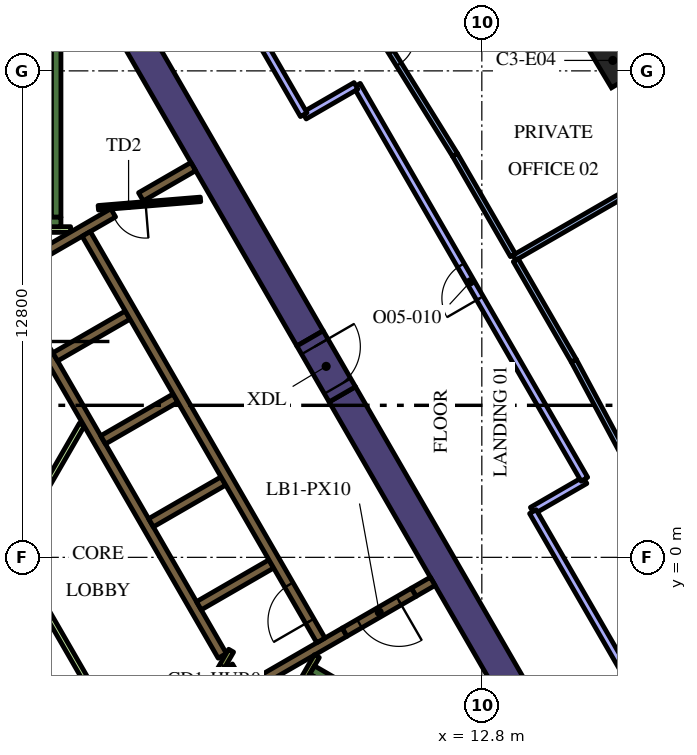
"""IFC4 building model, lengths in metres.
Left out: names, types, materials, properties, quantities, classifications, styles, units other than length and angle.
Written with IfcOpenShell. Run it as: python <this file> out.ifc"""

import sys

from ifc_helpers import new_model, si_unit, direction, frame, frame_2d, origin, origin_2d, place, context, subcontext, project, spatial, rectangle, extrude, element, fill, save


model = new_model("IFC4")
c1 = context("Model", 3, precision=1e-05, world=origin(), true_north=direction((0.0, 1.0)))
c2 = subcontext(c1, "Body", "Model", "MODEL_VIEW")
j1 = project(units=[si_unit("LENGTHUNIT", "METRE"), si_unit("PLANEANGLEUNIT", "RADIAN")], contexts=[c1])
p1 = place(None, origin())
s1 = spatial("IfcSite", under=j1, at=p1, CompositionType="ELEMENT")
p2 = place(p1, origin())
s2 = spatial("IfcBuilding", under=s1, at=p2, CompositionType="ELEMENT")
p3 = place(p2, frame((0.0, 0.0, 192.0)))
s3 = spatial("IfcBuildingStorey", under=s2, at=p3, CompositionType="ELEMENT", Elevation=192.0)
p4 = place(p3, frame((16.247, 13.075, 0.0), z_axis=(0.0, 0.0, 1.0), x_axis=(-0.513159311736, 0.85829337687, 0.0)))
e1 = element("IfcColumn", 1, at=p4, inside=s3, PredefinedType="COLUMN", context=c2, shape_type="SweptSolid", body=[
    extrude(rectangle(XDim=1.2, YDim=0.8, at=origin_2d()), origin(), (0.0, 0.0, 1.0), 4.2),
])
p5 = place(p3, frame((9.129, 4.289, 0.0), z_axis=(0.0, 0.0, 1.0), x_axis=(0.499995742806, -0.866027861663, 0.0)))
e2 = element("IfcWall", 2, at=p5, inside=s3, PredefinedType="SOLIDWALL", context=c2, shape_type="SweptSolid", body=[
    extrude(rectangle(XDim=12.527, YDim=0.8, at=frame_2d((6.264, 0.0))), origin(), (0.0, 0.0, 1.0), 4.2),
])
p6 = place(p3, frame((8.279, 5.761, 0.0), z_axis=(0.0, 0.0, 1.0), x_axis=(-0.500010359015, 0.866019422922, 0.0)))
e3 = element("IfcWall", 3, at=p6, inside=s3, PredefinedType="SOLIDWALL", context=c2, shape_type="SweptSolid", body=[
    extrude(rectangle(XDim=12.528, YDim=0.8, at=frame_2d((6.264, 0.0))), origin(), (0.0, 0.0, 1.0), 4.2),
])
p7 = place(p3, frame((8.334, -2.964, 0.0), z_axis=(0.0, 0.0, 1.0), x_axis=(0.866016039709, -0.500016218704, 0.0)))
e4 = element("IfcWall", 4, at=p7, inside=s3, PredefinedType="SOLIDWALL", context=c2, shape_type="SweptSolid", body=[
    extrude(rectangle(XDim=7.05, YDim=0.25, at=frame_2d((3.525, 0.0))), origin(), (0.0, 0.0, 1.0), 4.2),
])
p8 = place(p3, frame((8.168, -3.503, 0.0), z_axis=(0.0, 0.0, 1.0), x_axis=(0.49972245349, 0.866185586049, 0.0)))
e5 = element("IfcWall", 5, at=p8, inside=s3, PredefinedType="SOLIDWALL", context=c2, shape_type="SweptSolid", body=[
    extrude(rectangle(XDim=0.425, YDim=0.25, at=frame_2d((0.212, 0.0))), origin(), (0.0, 0.0, 1.0), 4.2),
])
p9 = place(p3, frame((1.6, 8.95, 0.0), z_axis=(0.0, 0.0, 1.0), x_axis=(0.0, 1.0, 0.0)))
e6 = element("IfcWall", 6, at=p9, inside=s3, PredefinedType="SOLIDWALL", context=c2, shape_type="SweptSolid", body=[
    extrude(rectangle(XDim=6.8, YDim=0.25, at=frame_2d((3.4, 0.0))), origin(), (0.0, 0.0, 1.0), 4.2),
])
p10 = place(p3, frame((1.05, 8.825, 0.0), z_axis=(0.0, 0.0, 1.0), x_axis=(1.0, 0.0, 0.0)))
e7 = element("IfcWall", 7, at=p10, inside=s3, PredefinedType="SOLIDWALL", context=c2, shape_type="SweptSolid", body=[
    extrude(rectangle(XDim=0.675, YDim=0.25, at=frame_2d((0.337, 0.0))), origin(), (0.0, 0.0, 1.0), 4.2),
])
p11 = place(p3, frame((9.19, -1.969, 0.0), z_axis=(0.0, 0.0, 1.0), x_axis=(-0.866057109641, -0.499945079824, 0.0)))
e8 = element("IfcWall", 8, at=p11, inside=s3, PredefinedType="SOLIDWALL", context=c2, shape_type="SweptSolid", body=[
    extrude(rectangle(XDim=3.291, YDim=0.25, at=frame_2d((1.646, 0.0))), origin(), (0.0, 0.0, 1.0), 4.2),
])
p12 = place(p3, frame((6.13, -2.867, 0.0), z_axis=(0.0, 0.0, 1.0), x_axis=(0.500160776593, -0.865932559475, 0.0)))
e9 = element("IfcWall", 9, at=p12, inside=s3, PredefinedType="SOLIDWALL", context=c2, shape_type="SweptSolid", body=[
    extrude(rectangle(XDim=0.627, YDim=0.25, at=frame_2d((0.313, 0.0))), origin(), (0.0, 0.0, 1.0), 4.2),
])
p13 = place(p3, frame((11.507, -0.631, 0.0), z_axis=(0.0, 0.0, 1.0), x_axis=(-0.866093731455, -0.499881634324, 0.0)))
e10 = element("IfcWall", 10, at=p13, inside=s3, PredefinedType="SOLIDWALL", context=c2, shape_type="SweptSolid", body=[
    extrude(rectangle(XDim=0.575, YDim=0.25, at=frame_2d((0.288, 0.0))), origin(), (0.0, 0.0, 1.0), 4.2),
])
p14 = place(p3, frame((3.1, 9.064, 0.0), z_axis=(0.0, 0.0, 1.0), x_axis=(-0.866033137035, -0.499986605379, 0.0)))
e11 = element("IfcWall", 11, at=p14, inside=s3, PredefinedType="SOLIDWALL", context=c2, shape_type="SweptSolid", body=[
    extrude(rectangle(XDim=3.467, YDim=0.25, at=frame_2d((1.733, 0.0))), origin(), (0.0, 0.0, 1.0), 4.2),
])
p15 = place(p3, frame((5.97, -2.591, 0.0), z_axis=(0.0, 0.0, 1.0), x_axis=(-0.499994469932, 0.866028596547, 0.0)))
e12 = element("IfcWall", 12, at=p15, inside=s3, PredefinedType="SOLIDWALL", context=c2, shape_type="SweptSolid", body=[
    extrude(rectangle(XDim=10.488, YDim=0.25, at=frame_2d((5.244, 0.0))), origin(), (0.0, 0.0, 1.0), 4.2),
])
p16 = place(p3, frame((1.574, 5.274, 0.0), z_axis=(0.0, 0.0, 1.0), x_axis=(0.866028486751, 0.499994660107, 0.0)))
e13 = element("IfcWall", 13, at=p16, inside=s3, PredefinedType="SOLIDWALL", context=c2, shape_type="SweptSolid", body=[
    extrude(rectangle(XDim=2.2, YDim=0.25, at=frame_2d((1.1, 0.0))), origin(), (0.0, 0.0, 1.0), 4.2),
])
for number, where, z_axis, x_axis in (
    (14, (2.834, 3.091, 0.0), (0.0, 0.0, 1.0), (0.866, 0.5, 0.0)),
    (15, (4.094, 0.909, 0.0), (0.0, 0.0, 1.0), (0.866, 0.5, 0.0)),
    (16, (5.354, -1.274, 0.0), (0.0, 0.0, 1.0), (0.866, 0.5, 0.0)),
):
    element("IfcWall", number, at=place(p3, frame(where, z_axis=z_axis, x_axis=x_axis)), inside=s3, PredefinedType="SOLIDWALL", context=c2, shape_type="SweptSolid", body=[
        extrude(rectangle(XDim=2.2, YDim=0.25, at=frame_2d((1.1, 0.0))), origin(), (0.0, 0.0, 1.0), 4.2),
    ])
p17 = place(p3, frame((3.83, 9.486, 0.0), z_axis=(0.0, 0.0, 1.0), x_axis=(0.865986202621, 0.500067892261, 0.0)))
e17 = element("IfcWall", 17, at=p17, inside=s3, PredefinedType="SOLIDWALL", context=c2, shape_type="SweptSolid", body=[
    extrude(rectangle(XDim=1.591, YDim=0.25, at=frame_2d((0.795, 0.0))), origin(), (0.0, 0.0, 1.0), 4.2),
])
p18 = place(p3, frame((1.05, 8.625, 0.0), z_axis=(0.0, 0.0, 1.0), x_axis=(1.0, 0.0, 0.0)))
e18 = element("IfcWall", 18, at=p18, inside=s3, PredefinedType="PARTITIONING", context=c2, shape_type="SweptSolid", body=[
    extrude(rectangle(XDim=0.929, YDim=0.15, at=frame_2d((0.464, 0.0))), origin(), (0.0, 0.0, 1.0), 3.1),
])
p19 = place(p3, frame((8.459, -2.599, 0.0), z_axis=(0.0, 0.0, 1.0), x_axis=(-0.500041054325, -0.866001699761, 0.0)))
e19 = element("IfcWall", 19, at=p19, inside=s3, PredefinedType="PARTITIONING", context=c2, shape_type="SweptSolid", body=[
    extrude(rectangle(XDim=0.929, YDim=0.15, at=frame_2d((0.464, 0.0))), origin(), (0.0, 0.0, 1.0), 4.2),
])
p20 = place(p3, frame((-1.887, 4.168, 0.0), z_axis=(0.0, 0.0, 1.0), x_axis=(0.499997069472, -0.866027095719, 0.0)))
e20 = element("IfcWall", 20, at=p20, inside=s3, PredefinedType="PARTITIONING", context=c2, shape_type="SweptSolid", body=[
    extrude(rectangle(XDim=9.106, YDim=0.15, at=frame_2d((4.553, 0.0))), origin(), (0.0, 0.0, 1.0), 3.1),
])
p21 = place(p3, frame((2.277, 3.493, 0.0), z_axis=(0.0, 0.0, 1.0), x_axis=(-0.499994550825, -0.866028549844, 0.0)))
e21 = element("IfcWall", 21, at=p21, inside=s3, PredefinedType="PARTITIONING", context=c2, shape_type="SweptSolid", body=[
    extrude(rectangle(XDim=3.65, YDim=0.15, at=frame_2d((1.825, 0.0))), origin(), (0.0, 0.0, 1.0), 3.1),
])
p22 = place(p3, frame((8.565, -2.185, 0.0), z_axis=(0.0, 0.0, 1.0), x_axis=(-0.499997954832, 0.866026584559, 0.0)))
e22 = element("IfcWall", 22, at=p22, inside=s3, PredefinedType="SOLIDWALL", context=c2, shape_type="SweptSolid", body=[
    extrude(rectangle(XDim=12.35, YDim=0.25, at=frame_2d((6.175, 0.0))), origin(), (0.0, 0.0, 1.0), 4.2),
])
p23 = place(p22, frame((0.585, 0.0, 0.0)))
e23 = element("IfcOpeningElement", 23, at=p23, cuts=e22, PredefinedType="OPENING", context=c2, shape_type="SweptSolid", body=[
    extrude(rectangle(XDim=1.1, YDim=2.1, at=frame_2d((0.55, 1.05))), frame((0.0, 0.135, 0.0), z_axis=(0.0, -1.0, 0.0), x_axis=(1.0, 0.0, 0.0)), (0.0, 0.0, 1.0), 0.27),
])
p24 = place(p3, frame((5.398, 9.419, 0.0), z_axis=(0.0, 0.0, 1.0), x_axis=(-0.996653416376, -0.081743303248, 0.0)))
e24 = element("IfcWall", 24, at=p24, inside=s3, PredefinedType="PARTITIONING", context=c2, shape_type="SweptSolid", body=[
    extrude(rectangle(XDim=2.7, YDim=0.12, at=frame_2d((1.35, 0.0))), origin(), (0.0, 0.0, 1.0), 3.1),
])
p25 = place(p24, frame((1.45, 0.0, 0.0)))
e25 = element("IfcOpeningElement", 25, at=p25, cuts=e24, PredefinedType="OPENING", context=c2, shape_type="SweptSolid", body=[
    extrude(rectangle(XDim=0.9, YDim=2.1, at=frame_2d((0.45, 1.05))), frame((0.0, 0.07, 0.0), z_axis=(0.0, -1.0, 0.0), x_axis=(1.0, 0.0, 0.0)), (0.0, 0.0, 1.0), 0.14),
])
p26 = place(p3, frame((6.203, -2.456, 0.0), z_axis=(0.0, 0.0, 1.0), x_axis=(-0.500043961785, -0.866000020948, 0.0)))
e26 = element("IfcWall", 26, at=p26, inside=s3, PredefinedType="PARTITIONING", context=c2, shape_type="SweptSolid", body=[
    extrude(rectangle(XDim=1.95, YDim=0.15, at=frame_2d((0.975, 0.0))), origin(), (0.0, 0.0, 1.0), 4.2),
])
p27 = place(p26, frame((0.45, 0.0, 0.0)))
e27 = element("IfcOpeningElement", 27, at=p27, cuts=e26, PredefinedType="OPENING", context=c2, shape_type="SweptSolid", body=[
    extrude(rectangle(XDim=0.9, YDim=2.1, at=frame_2d((0.45, 1.05))), frame((0.0, 0.085, 0.0), z_axis=(0.0, -1.0, 0.0), x_axis=(1.0, 0.0, 0.0)), (0.0, 0.0, 1.0), 0.17),
])
p28 = place(p3, frame((11.009, -0.919, 0.0), z_axis=(0.0, 0.0, 1.0), x_axis=(-0.866059744384, -0.49994051562, 0.0)))
e28 = element("IfcWall", 28, at=p28, inside=s3, PredefinedType="SOLIDWALL", context=c2, shape_type="SweptSolid", body=[
    extrude(rectangle(XDim=2.1, YDim=0.25, at=frame_2d((1.05, 0.0))), origin(), (0.0, 0.0, 1.0), 4.2),
])
p29 = place(p28, frame((0.45, 0.0, 0.0)))
e29 = element("IfcOpeningElement", 29, at=p29, cuts=e28, PredefinedType="OPENING", context=c2, shape_type="SweptSolid", body=[
    extrude(rectangle(XDim=1.2, YDim=2.1, at=frame_2d((0.6, 1.05))), frame((0.0, 0.135, 0.0), z_axis=(0.0, -1.0, 0.0), x_axis=(1.0, 0.0, 0.0)), (0.0, 0.0, 1.0), 0.27),
])
p30 = place(p3, frame((8.279, 5.761, 0.0), z_axis=(0.0, 0.0, 1.0), x_axis=(0.500062241894, -0.865989465428, 0.0)))
e30 = element("IfcWall", 30, at=p30, inside=s3, PredefinedType="SOLIDWALL", context=c2, shape_type="SweptSolid", body=[
    extrude(rectangle(XDim=1.7, YDim=0.8, at=frame_2d((0.85, 0.0))), origin(), (0.0, 0.0, 1.0), 4.2),
])
p31 = place(p30, frame((0.25, 0.0, 0.0)))
e31 = element("IfcOpeningElement", 31, at=p31, cuts=e30, PredefinedType="OPENING", context=c2, shape_type="SweptSolid", body=[
    extrude(rectangle(XDim=1.2, YDim=2.1, at=frame_2d((0.6, 1.05))), frame((0.0, 0.41, 0.0), z_axis=(0.0, -1.0, 0.0), x_axis=(1.0, 0.0, 0.0)), (0.0, 0.0, 1.0), 0.82),
])
p32 = place(p3, frame((13.656, 7.884, 0.0), z_axis=(0.0, 0.0, 1.0), x_axis=(0.866022959057, 0.500004234368, 0.0)))
e32 = element("IfcWall", 32, at=p32, inside=s3, PredefinedType="PARTITIONING", context=c2, shape_type="SweptSolid", body=[
    extrude(rectangle(XDim=5.0, YDim=0.15, at=frame_2d((2.5, 0.0))), origin(), (0.0, 0.0, 1.0), 3.1),
])
p33 = place(p3, frame((15.219, 5.177, 0.0), z_axis=(0.0, 0.0, 1.0), x_axis=(0.472318506028, -0.881427948765, 0.0)))
e33 = element("IfcWall", 33, at=p33, inside=s3, PredefinedType="PARTITIONING", context=c2, shape_type="SweptSolid", body=[
    extrude(rectangle(XDim=6.419, YDim=0.15, at=frame_2d((3.21, 0.0))), origin(), (0.0, 0.0, 1.0), 3.1),
])
p34 = place(p33, frame((2.719, 0.0, 0.0)))
e34 = element("IfcOpeningElement", 34, at=p34, cuts=e33, PredefinedType="OPENING", context=c2, shape_type="SweptSolid", body=[
    extrude(rectangle(XDim=0.9, YDim=2.1, at=frame_2d((0.45, 1.05))), frame((0.0, 0.085, 0.0), z_axis=(0.0, -1.0, 0.0), x_axis=(1.0, 0.0, 0.0)), (0.0, 0.0, 1.0), 0.17),
])
p35 = place(p3, frame((15.219, 5.177, 0.0), z_axis=(0.0, 0.0, 1.0), x_axis=(-0.500054937028, 0.865993683553, 0.0)))
e35 = element("IfcWall", 35, at=p35, inside=s3, PredefinedType="PARTITIONING", context=c2, shape_type="SweptSolid", body=[
    extrude(rectangle(XDim=3.051, YDim=0.15, at=frame_2d((1.525, 0.0))), origin(), (0.0, 0.0, 1.0), 3.1),
])
p36 = place(p3, frame((13.618, 7.949, 0.0), z_axis=(0.0, 0.0, 1.0), x_axis=(-0.499994921628, 0.866028335764, 0.0)))
e36 = element("IfcWall", 36, at=p36, inside=s3, PredefinedType="PARTITIONING", context=c2, shape_type="SweptSolid", body=[
    extrude(rectangle(XDim=3.051, YDim=0.15, at=frame_2d((1.525, 0.0))), origin(), (0.0, 0.0, 1.0), 3.1),
])
p37 = place(p3, frame((8.708, 16.046, 0.0), z_axis=(0.0, 0.0, 1.0), x_axis=(0.527179193015, -0.849754140003, 0.0)))
e37 = element("IfcWall", 37, at=p37, inside=s3, PredefinedType="PARTITIONING", context=c2, shape_type="SweptSolid", body=[
    extrude(rectangle(XDim=6.42, YDim=0.15, at=frame_2d((3.21, 0.0))), origin(), (0.0, 0.0, 1.0), 3.1),
])
p38 = place(p37, frame((2.719, 0.0, 0.0)))
e38 = element("IfcOpeningElement", 38, at=p38, cuts=e37, PredefinedType="OPENING", context=c2, shape_type="SweptSolid", body=[
    extrude(rectangle(XDim=0.9, YDim=2.1, at=frame_2d((0.45, 1.05))), frame((0.0, 0.085, 0.0), z_axis=(0.0, -1.0, 0.0), x_axis=(1.0, 0.0, 0.0)), (0.0, 0.0, 1.0), 0.17),
])
p39 = place(p3, frame((14.128, 1.229, 0.0), z_axis=(0.0, 0.0, 1.0), x_axis=(0.866028054938, 0.499995408039, 0.0)))
e39 = element("IfcWall", 39, at=p39, inside=s3, PredefinedType="PARTITIONING", context=c2, shape_type="SweptSolid", body=[
    extrude(rectangle(XDim=1.6, YDim=0.2, at=frame_2d((0.8, 0.0))), origin(), (0.0, 0.0, 1.0), 3.1),
])
p40 = place(p3, frame((15.499, 2.055, 0.0), z_axis=(0.0, 0.0, 1.0), x_axis=(-0.499986694938, 0.866033085329, 0.0)))
e40 = element("IfcWall", 40, at=p40, inside=s3, PredefinedType="PARTITIONING", context=c2, shape_type="SweptSolid", body=[
    extrude(rectangle(XDim=11.97, YDim=0.2, at=frame_2d((5.985, 0.0))), origin(), (0.0, 0.0, 1.0), 3.1),
])
p41 = place(p40, frame((5.5, 0.0, 0.0)))
e41 = element("IfcOpeningElement", 41, at=p41, cuts=e40, PredefinedType="OPENING", context=c2, shape_type="SweptSolid", body=[
    extrude(rectangle(XDim=1.0, YDim=2.1, at=frame_2d((0.5, 1.05))), frame((0.0, 0.11, 0.0), z_axis=(0.0, -1.0, 0.0), x_axis=(1.0, 0.0, 0.0)), (0.0, 0.0, 1.0), 0.22),
])
p42 = place(p3, frame((9.488, 12.406, 0.0), z_axis=(0.0, 0.0, 1.0), x_axis=(-0.865975818674, -0.500085874098, 0.0)))
e42 = element("IfcWall", 42, at=p42, inside=s3, PredefinedType="PARTITIONING", context=c2, shape_type="SweptSolid", body=[
    extrude(rectangle(XDim=1.57, YDim=0.2, at=frame_2d((0.785, 0.0))), origin(), (0.0, 0.0, 1.0), 3.1),
])
p43 = place(p3, frame((8.113, 11.647, 0.0), z_axis=(0.0, 0.0, 1.0), x_axis=(-0.500001933108, 0.866024287701, 0.0)))
e43 = element("IfcWall", 43, at=p43, inside=s3, PredefinedType="PARTITIONING", context=c2, shape_type="SweptSolid", body=[
    extrude(rectangle(XDim=8.721, YDim=0.2, at=frame_2d((4.361, 0.0))), origin(), (0.0, 0.0, 1.0), 3.1),
])
p44 = place(p3, frame((18.489, -6.324, 0.0), z_axis=(0.0, 0.0, 1.0), x_axis=(-0.500006134913, 0.866021861762, 0.0)))
e44 = element("IfcWall", 44, at=p44, inside=s3, PredefinedType="PARTITIONING", context=c2, shape_type="SweptSolid", body=[
    extrude(rectangle(XDim=8.691, YDim=0.2, at=frame_2d((4.346, 0.0))), origin(), (0.0, 0.0, 1.0), 3.1),
])
p45 = place(p23, origin())
e45 = element("IfcDoor", 45, at=p45, inside=s3, OperationType="DOUBLE_DOOR_SLIDING", PredefinedType="DOOR", context=c2, shape_type="SweptSolid", body=[
    extrude(rectangle(XDim=1.1, YDim=2.1, at=frame_2d((0.55, 1.05))), frame((0.0, 0.025, 0.0), z_axis=(0.0, -1.0, 0.0), x_axis=(1.0, 0.0, 0.0)), (0.0, 0.0, 1.0), 0.05),
])
fill(e23, e45)
p46 = place(p25, origin())
e46 = element("IfcDoor", 46, at=p46, inside=s3, OperationType="SINGLE_SWING_LEFT", PredefinedType="DOOR", context=c2, shape_type="SweptSolid", body=[
    extrude(rectangle(XDim=0.9, YDim=2.1, at=frame_2d((0.45, 1.05))), frame((0.0, 0.025, 0.0), z_axis=(0.0, -1.0, 0.0), x_axis=(1.0, 0.0, 0.0)), (0.0, 0.0, 1.0), 0.05),
])
fill(e25, e46)
p47 = place(p27, origin())
e47 = element("IfcDoor", 47, at=p47, inside=s3, OperationType="SINGLE_SWING_LEFT", PredefinedType="DOOR", context=c2, shape_type="SweptSolid", body=[
    extrude(rectangle(XDim=0.9, YDim=2.1, at=frame_2d((0.45, 1.05))), frame((0.0, 0.025, 0.0), z_axis=(0.0, -1.0, 0.0), x_axis=(1.0, 0.0, 0.0)), (0.0, 0.0, 1.0), 0.05),
])
fill(e27, e47)
p48 = place(p29, origin())
e48 = element("IfcDoor", 48, at=p48, inside=s3, OperationType="SINGLE_SWING_LEFT", PredefinedType="DOOR", context=c2, shape_type="SweptSolid", body=[
    extrude(rectangle(XDim=1.2, YDim=2.1, at=frame_2d((0.6, 1.05))), frame((0.0, 0.025, 0.0), z_axis=(0.0, -1.0, 0.0), x_axis=(1.0, 0.0, 0.0)), (0.0, 0.0, 1.0), 0.05),
])
fill(e29, e48)
p49 = place(p31, origin())
e49 = element("IfcDoor", 49, at=p49, inside=s3, OperationType="SINGLE_SWING_LEFT", PredefinedType="DOOR", context=c2, shape_type="SweptSolid", body=[
    extrude(rectangle(XDim=1.2, YDim=2.1, at=frame_2d((0.6, 1.05))), frame((0.0, 0.025, 0.0), z_axis=(0.0, -1.0, 0.0), x_axis=(1.0, 0.0, 0.0)), (0.0, 0.0, 1.0), 0.05),
])
fill(e31, e49)
p50 = place(p38, origin())
e50 = element("IfcDoor", 50, at=p50, inside=s3, OperationType="SINGLE_SWING_LEFT", PredefinedType="DOOR", context=c2, shape_type="SweptSolid", body=[
    extrude(rectangle(XDim=0.9, YDim=2.1, at=frame_2d((0.45, 1.05))), frame((0.0, 0.025, 0.0), z_axis=(0.0, -1.0, 0.0), x_axis=(1.0, 0.0, 0.0)), (0.0, 0.0, 1.0), 0.05),
])
fill(e38, e50)
p51 = place(p41, origin())
e51 = element("IfcDoor", 51, at=p51, inside=s3, OperationType="SINGLE_SWING_RIGHT", PredefinedType="DOOR", context=c2, shape_type="SweptSolid", body=[
    extrude(rectangle(XDim=1.0, YDim=2.1, at=frame_2d((0.5, 1.05))), frame((0.0, 0.025, 0.0), z_axis=(0.0, -1.0, 0.0), x_axis=(1.0, 0.0, 0.0)), (0.0, 0.0, 1.0), 0.05),
])
fill(e41, e51)
save(model, sys.argv[1])
